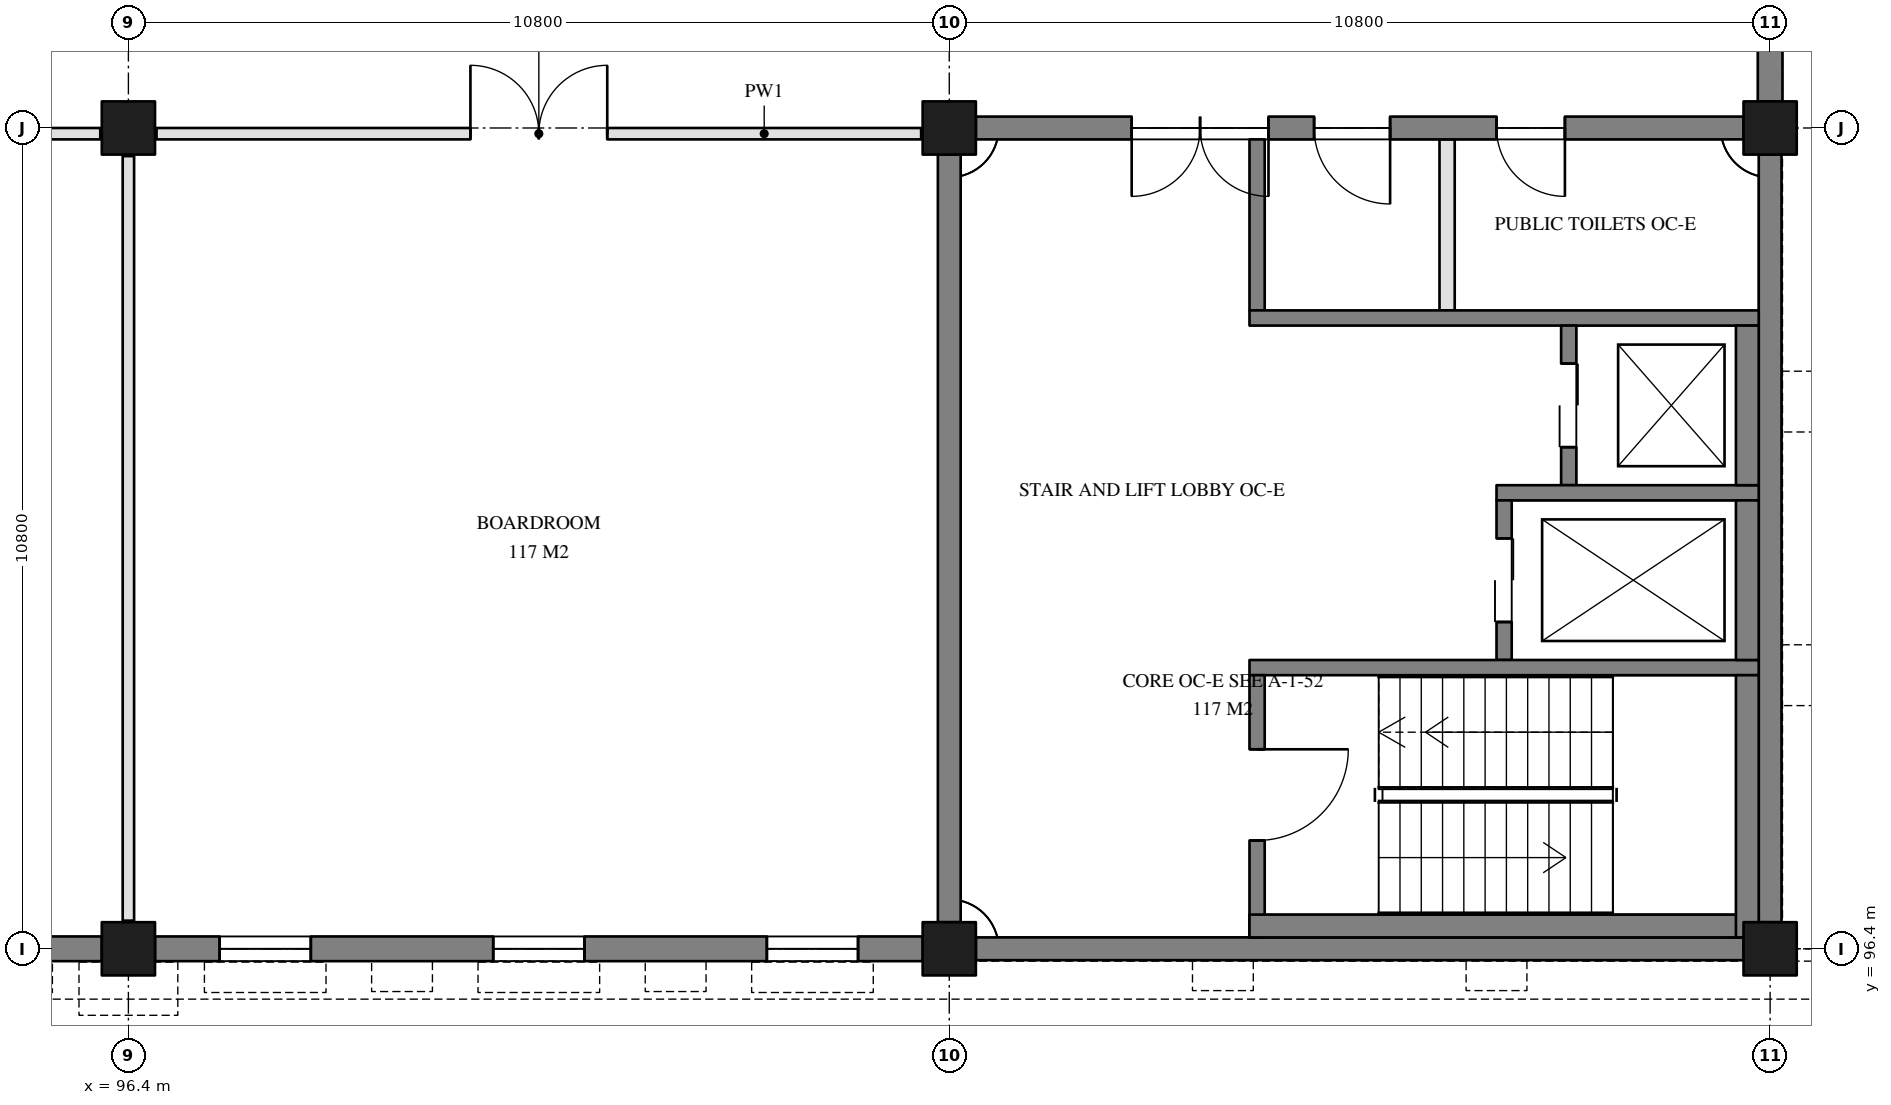
"""IFC4 building model, lengths in metres.
Left out: names, types, materials, properties, quantities, classifications, styles, units other than length and angle.
Written with IfcOpenShell. Run it as: python <this file> out.ifc"""

import sys

from ifc_helpers import new_model, si_unit, direction, frame, frame_2d, origin, origin_2d, place, context, subcontext, project, spatial, rectangle, extrude, element, fill, save


model = new_model("IFC4")
c1 = context("Model", 3, precision=1e-05, world=origin(), true_north=direction((0.0, 1.0)))
c2 = subcontext(c1, "Body", "Model", "MODEL_VIEW")
j1 = project(units=[si_unit("LENGTHUNIT", "METRE"), si_unit("PLANEANGLEUNIT", "RADIAN")], contexts=[c1])
p1 = place(None, origin())
s1 = spatial("IfcSite", under=j1, at=p1, CompositionType="ELEMENT")
p2 = place(p1, origin())
s2 = spatial("IfcBuilding", under=s1, at=p2, CompositionType="ELEMENT")
p3 = place(p2, frame((0.0, 0.0, 16.5)))
s3 = spatial("IfcBuildingStorey", under=s2, at=p3, CompositionType="ELEMENT", Elevation=16.5)
for number, where, z_axis, x_axis in (
    (1, (96.4, 96.4, 0.0), (0.0, 0.0, 1.0), (1.0, 0.0, 0.0)),
    (2, (96.4, 107.2, 0.0), (0.0, 0.0, 1.0), (1.0, 0.0, 0.0)),
    (3, (107.2, 96.4, 0.0), (0.0, 0.0, 1.0), (1.0, 0.0, 0.0)),
    (4, (107.2, 107.2, 0.0), (0.0, 0.0, 1.0), (1.0, 0.0, 0.0)),
    (5, (118.0, 96.4, 0.0), (0.0, 0.0, 1.0), (1.0, 0.0, 0.0)),
    (6, (118.0, 107.2, 0.0), (0.0, 0.0, 1.0), (1.0, 0.0, 0.0)),
):
    element("IfcColumn", number, at=place(p3, frame(where, z_axis=z_axis, x_axis=x_axis)), inside=s3, PredefinedType="COLUMN", context=c2, shape_type="SweptSolid", body=[
        extrude(rectangle(XDim=0.7, YDim=0.7, at=origin_2d()), origin(), (0.0, 0.0, 1.0), 3.9),
    ])
p4 = place(p3, frame((107.55, 96.4, 0.0), z_axis=(0.0, 0.0, 1.0), x_axis=(1.0, 0.0, 0.0)))
e7 = element("IfcWall", 7, at=p4, inside=s3, PredefinedType="SOLIDWALL", context=c2, shape_type="SweptSolid", body=[
    extrude(rectangle(XDim=10.1, YDim=0.3, at=frame_2d((5.05, 0.0))), origin(), (0.0, 0.0, 1.0), 3.9),
])
p5 = place(p3, frame((118.0, 96.75, 0.0), z_axis=(0.0, 0.0, 1.0), x_axis=(0.0, 1.0, 0.0)))
e8 = element("IfcWall", 8, at=p5, inside=s3, PredefinedType="SOLIDWALL", context=c2, shape_type="SweptSolid", body=[
    extrude(rectangle(XDim=10.1, YDim=0.3, at=frame_2d((5.05, 0.0))), origin(), (0.0, 0.0, 1.0), 3.9),
])
p6 = place(p3, frame((117.65, 107.2, 0.0), z_axis=(0.0, 0.0, 1.0), x_axis=(-1.0, 0.0, 0.0)))
e9 = element("IfcWall", 9, at=p6, inside=s3, PredefinedType="SOLIDWALL", context=c2, shape_type="SweptSolid", body=[
    extrude(rectangle(XDim=10.1, YDim=0.3, at=frame_2d((5.05, 0.0))), origin(), (0.0, 0.0, 1.0), 3.9),
])
p7 = place(p6, frame((6.25, 0.0, 0.0)))
e10 = element("IfcOpeningElement", 10, at=p7, cuts=e9, PredefinedType="OPENING", context=c2, shape_type="SweptSolid", body=[
    extrude(rectangle(XDim=1.8, YDim=2.1, at=frame_2d((0.9, 1.05))), frame((0.0, 0.16, 0.0), z_axis=(0.0, -1.0, 0.0), x_axis=(1.0, 0.0, 0.0)), (0.0, 0.0, 1.0), 0.32),
])
p8 = place(p6, frame((4.65, 0.0, 0.0)))
e11 = element("IfcOpeningElement", 11, at=p8, cuts=e9, PredefinedType="OPENING", context=c2, shape_type="SweptSolid", body=[
    extrude(rectangle(XDim=1.0, YDim=2.1, at=frame_2d((0.5, 1.05))), frame((0.0, 0.16, 0.0), z_axis=(0.0, -1.0, 0.0), x_axis=(1.0, 0.0, 0.0)), (0.0, 0.0, 1.0), 0.32),
])
p9 = place(p6, frame((2.35, 0.0, 0.0)))
e12 = element("IfcOpeningElement", 12, at=p9, cuts=e9, PredefinedType="OPENING", context=c2, shape_type="SweptSolid", body=[
    extrude(rectangle(XDim=0.9, YDim=2.1, at=frame_2d((0.45, 1.05))), frame((0.0, 0.16, 0.0), z_axis=(0.0, -1.0, 0.0), x_axis=(1.0, 0.0, 0.0)), (0.0, 0.0, 1.0), 0.32),
])
p10 = place(p3, frame((107.2, 106.85, 0.0), z_axis=(0.0, 0.0, 1.0), x_axis=(0.0, -1.0, 0.0)))
e13 = element("IfcWall", 13, at=p10, inside=s3, PredefinedType="SOLIDWALL", context=c2, shape_type="SweptSolid", body=[
    extrude(rectangle(XDim=10.1, YDim=0.3, at=frame_2d((5.05, 0.0))), origin(), (0.0, 0.0, 1.0), 3.9),
])
p11 = place(p3, frame((92.2, 96.4, 0.0), z_axis=(0.0, 0.0, 1.0), x_axis=(1.0, 0.0, 0.0)))
e14 = element("IfcWall", 14, at=p11, inside=s3, PredefinedType="SOLIDWALL", context=c2, shape_type="SweptSolid", body=[
    extrude(rectangle(XDim=3.85, YDim=0.325, at=frame_2d((1.925, 0.0))), origin(), (0.0, 0.0, 1.0), 2.8),
])
p12 = place(p11, frame((1.8, 0.0, 0.75)))
e15 = element("IfcOpeningElement", 15, at=p12, cuts=e14, PredefinedType="OPENING", context=c2, shape_type="SweptSolid", body=[
    extrude(rectangle(XDim=1.2, YDim=1.95, at=frame_2d((0.6, 0.975))), frame((0.0, 0.172, 0.0), z_axis=(0.0, -1.0, 0.0), x_axis=(1.0, 0.0, 0.0)), (0.0, 0.0, 1.0), 0.345),
])
p13 = place(p3, frame((96.75, 96.4, 0.0), z_axis=(0.0, 0.0, 1.0), x_axis=(1.0, 0.0, 0.0)))
e16 = element("IfcWall", 16, at=p13, inside=s3, PredefinedType="SOLIDWALL", context=c2, shape_type="SweptSolid", body=[
    extrude(rectangle(XDim=10.1, YDim=0.325, at=frame_2d((5.05, 0.0))), origin(), (0.0, 0.0, 1.0), 2.8),
])
p14 = place(p13, frame((0.85, 0.0, 0.75)))
e17 = element("IfcOpeningElement", 17, at=p14, cuts=e16, PredefinedType="OPENING", context=c2, shape_type="SweptSolid", body=[
    extrude(rectangle(XDim=1.2, YDim=1.95, at=frame_2d((0.6, 0.975))), frame((0.0, 0.172, 0.0), z_axis=(0.0, -1.0, 0.0), x_axis=(1.0, 0.0, 0.0)), (0.0, 0.0, 1.0), 0.345),
])
p15 = place(p13, frame((4.45, 0.0, 0.75)))
e18 = element("IfcOpeningElement", 18, at=p15, cuts=e16, PredefinedType="OPENING", context=c2, shape_type="SweptSolid", body=[
    extrude(rectangle(XDim=1.2, YDim=1.95, at=frame_2d((0.6, 0.975))), frame((0.0, 0.172, 0.0), z_axis=(0.0, -1.0, 0.0), x_axis=(1.0, 0.0, 0.0)), (0.0, 0.0, 1.0), 0.345),
])
p16 = place(p13, frame((8.05, 0.0, 0.75)))
e19 = element("IfcOpeningElement", 19, at=p16, cuts=e16, PredefinedType="OPENING", context=c2, shape_type="SweptSolid", body=[
    extrude(rectangle(XDim=1.2, YDim=1.95, at=frame_2d((0.6, 0.975))), frame((0.0, 0.172, 0.0), z_axis=(0.0, -1.0, 0.0), x_axis=(1.0, 0.0, 0.0)), (0.0, 0.0, 1.0), 0.345),
])
p17 = place(p3, frame((118.0, 107.55, 0.0), z_axis=(0.0, 0.0, 1.0), x_axis=(0.0, 1.0, 0.0)))
e20 = element("IfcWall", 20, at=p17, inside=s3, PredefinedType="SOLIDWALL", context=c2, shape_type="SweptSolid", body=[
    extrude(rectangle(XDim=3.85, YDim=0.325, at=frame_2d((1.925, 0.0))), origin(), (0.0, 0.0, 1.0), 2.8),
])
p18 = place(p17, frame((1.0, 0.0, 0.9)))
e21 = element("IfcOpeningElement", 21, at=p18, cuts=e20, PredefinedType="OPENING", context=c2, shape_type="SweptSolid", body=[
    extrude(rectangle(XDim=0.9, YDim=1.8, at=frame_2d((0.45, 0.9))), frame((0.0, 0.172, 0.0), z_axis=(0.0, -1.0, 0.0), x_axis=(1.0, 0.0, 0.0)), (0.0, 0.0, 1.0), 0.345),
])
p19 = place(p3, frame((111.25, 107.05, 0.0), z_axis=(0.0, 0.0, 1.0), x_axis=(0.0, -1.0, 0.0)))
e22 = element("IfcWall", 22, at=p19, inside=s3, PredefinedType="SOLIDWALL", context=c2, shape_type="SweptSolid", body=[
    extrude(rectangle(XDim=2.25, YDim=0.2, at=frame_2d((1.125, 0.0))), origin(), (0.0, 0.0, 1.0), 3.6),
])
p20 = place(p3, frame((111.15, 104.7, 0.0), z_axis=(0.0, 0.0, 1.0), x_axis=(1.0, 0.0, 0.0)))
e23 = element("IfcWall", 23, at=p20, inside=s3, PredefinedType="SOLIDWALL", context=c2, shape_type="SweptSolid", body=[
    extrude(rectangle(XDim=6.7, YDim=0.2, at=frame_2d((3.35, 0.0))), origin(), (0.0, 0.0, 1.0), 3.6),
])
p21 = place(p3, frame((115.35, 104.6, 0.0), z_axis=(0.0, 0.0, 1.0), x_axis=(0.0, -1.0, 0.0)))
e24 = element("IfcWall", 24, at=p21, inside=s3, PredefinedType="SOLIDWALL", context=c2, shape_type="SweptSolid", body=[
    extrude(rectangle(XDim=2.1, YDim=0.2, at=frame_2d((1.05, 0.0))), origin(), (0.0, 0.0, 1.0), 3.6),
])
p22 = place(p21, frame((0.5, 0.0, 0.0)))
e25 = element("IfcOpeningElement", 25, at=p22, cuts=e24, PredefinedType="OPENING", context=c2, shape_type="SweptSolid", body=[
    extrude(rectangle(XDim=1.1, YDim=2.1, at=frame_2d((0.55, 1.05))), frame((0.0, 0.11, 0.0), z_axis=(0.0, -1.0, 0.0), x_axis=(1.0, 0.0, 0.0)), (0.0, 0.0, 1.0), 0.22),
])
p23 = place(p3, frame((114.4, 102.4, 0.0), z_axis=(0.0, 0.0, 1.0), x_axis=(1.0, 0.0, 0.0)))
e26 = element("IfcWall", 26, at=p23, inside=s3, PredefinedType="SOLIDWALL", context=c2, shape_type="SweptSolid", body=[
    extrude(rectangle(XDim=3.45, YDim=0.2, at=frame_2d((1.725, 0.0))), origin(), (0.0, 0.0, 1.0), 3.6),
])
p24 = place(p3, frame((114.5, 102.3, 0.0), z_axis=(0.0, 0.0, 1.0), x_axis=(0.0, -1.0, 0.0)))
e27 = element("IfcWall", 27, at=p24, inside=s3, PredefinedType="SOLIDWALL", context=c2, shape_type="SweptSolid", body=[
    extrude(rectangle(XDim=2.1, YDim=0.2, at=frame_2d((1.05, 0.0))), origin(), (0.0, 0.0, 1.0), 3.6),
])
p25 = place(p24, frame((0.5, 0.0, 0.0)))
e28 = element("IfcOpeningElement", 28, at=p25, cuts=e27, PredefinedType="OPENING", context=c2, shape_type="SweptSolid", body=[
    extrude(rectangle(XDim=1.1, YDim=2.1, at=frame_2d((0.55, 1.05))), frame((0.0, 0.11, 0.0), z_axis=(0.0, -1.0, 0.0), x_axis=(1.0, 0.0, 0.0)), (0.0, 0.0, 1.0), 0.22),
])
p26 = place(p3, frame((111.15, 100.1, 0.0), z_axis=(0.0, 0.0, 1.0), x_axis=(1.0, 0.0, 0.0)))
e29 = element("IfcWall", 29, at=p26, inside=s3, PredefinedType="SOLIDWALL", context=c2, shape_type="SweptSolid", body=[
    extrude(rectangle(XDim=6.7, YDim=0.2, at=frame_2d((3.35, 0.0))), origin(), (0.0, 0.0, 1.0), 3.6),
])
p27 = place(p3, frame((111.25, 100.0, 0.0), z_axis=(0.0, 0.0, 1.0), x_axis=(0.0, -1.0, 0.0)))
e30 = element("IfcWall", 30, at=p27, inside=s3, PredefinedType="SOLIDWALL", context=c2, shape_type="SweptSolid", body=[
    extrude(rectangle(XDim=3.45, YDim=0.2, at=frame_2d((1.725, 0.0))), origin(), (0.0, 0.0, 1.0), 3.6),
])
p28 = place(p27, frame((0.975, 0.0, 0.0)))
e31 = element("IfcOpeningElement", 31, at=p28, cuts=e30, PredefinedType="OPENING", context=c2, shape_type="SweptSolid", body=[
    extrude(rectangle(XDim=1.2, YDim=2.1, at=frame_2d((0.6, 1.05))), frame((0.0, 0.11, 0.0), z_axis=(0.0, -1.0, 0.0), x_axis=(1.0, 0.0, 0.0)), (0.0, 0.0, 1.0), 0.22),
])
p29 = place(p3, frame((111.15, 96.7, -0.3), z_axis=(0.0, 0.0, 1.0), x_axis=(1.0, 0.0, 0.0)))
e32 = element("IfcWall", 32, at=p29, inside=s3, PredefinedType="SOLIDWALL", context=c2, shape_type="SweptSolid", body=[
    extrude(rectangle(XDim=6.7, YDim=0.3, at=frame_2d((3.35, 0.0))), origin(), (0.0, 0.0, 1.0), 3.9),
])
p30 = place(p3, frame((117.7, 100.0, -0.3), z_axis=(0.0, 0.0, 1.0), x_axis=(0.0, -1.0, 0.0)))
e33 = element("IfcWall", 33, at=p30, inside=s3, PredefinedType="SOLIDWALL", context=c2, shape_type="SweptSolid", body=[
    extrude(rectangle(XDim=3.45, YDim=0.3, at=frame_2d((1.725, 0.0))), origin(), (0.0, 0.0, 1.0), 3.9),
])
for number, where, z_axis, x_axis in (
    (34, (117.7, 104.6, -0.3), (0.0, 0.0, 1.0), (0.0, -1.0, 0.0)),
    (35, (117.7, 102.3, -0.3), (0.0, 0.0, 1.0), (0.0, -1.0, 0.0)),
):
    element("IfcWall", number, at=place(p3, frame(where, z_axis=z_axis, x_axis=x_axis)), inside=s3, PredefinedType="SOLIDWALL", context=c2, shape_type="SweptSolid", body=[
        extrude(rectangle(XDim=2.1, YDim=0.3, at=frame_2d((1.05, 0.0))), origin(), (0.0, 0.0, 1.0), 3.9),
    ])
p31 = place(p3, frame((113.75, 107.05, 0.0), z_axis=(0.0, 0.0, 1.0), x_axis=(0.0, -1.0, 0.0)))
e36 = element("IfcWall", 36, at=p31, inside=s3, PredefinedType="PARTITIONING", context=c2, shape_type="SweptSolid", body=[
    extrude(rectangle(XDim=2.25, YDim=0.2, at=frame_2d((1.125, 0.0))), origin(), (0.0, 0.0, 1.0), 3.6),
])
p32 = place(p3, frame((85.97, 107.125, 0.0), z_axis=(0.0, 0.0, 1.0), x_axis=(1.0, 0.0, 0.0)))
e37 = element("IfcWall", 37, at=p32, inside=s3, PredefinedType="PARTITIONING", context=c2, shape_type="SweptSolid", body=[
    extrude(rectangle(XDim=10.06, YDim=0.15, at=frame_2d((5.03, 0.0))), origin(), (0.0, 0.0, 1.0), 2.8),
])
p33 = place(p32, frame((4.13, 0.0, 0.0)))
e38 = element("IfcOpeningElement", 38, at=p33, cuts=e37, PredefinedType="OPENING", context=c2, shape_type="SweptSolid", body=[
    extrude(rectangle(XDim=1.8, YDim=2.1, at=frame_2d((0.9, 1.05))), frame((0.0, 0.085, 0.0), z_axis=(0.0, -1.0, 0.0), x_axis=(1.0, 0.0, 0.0)), (0.0, 0.0, 1.0), 0.17),
])
p34 = place(p3, frame((96.77, 107.125, 0.0), z_axis=(0.0, 0.0, 1.0), x_axis=(1.0, 0.0, 0.0)))
e39 = element("IfcWall", 39, at=p34, inside=s3, PredefinedType="PARTITIONING", context=c2, shape_type="SweptSolid", body=[
    extrude(rectangle(XDim=10.06, YDim=0.15, at=frame_2d((5.03, 0.0))), origin(), (0.0, 0.0, 1.0), 2.8),
])
p35 = place(p34, frame((4.13, 0.0, 0.0)))
e40 = element("IfcOpeningElement", 40, at=p35, cuts=e39, PredefinedType="OPENING", context=c2, shape_type="SweptSolid", body=[
    extrude(rectangle(XDim=1.8, YDim=2.1, at=frame_2d((0.9, 1.05))), frame((0.0, 0.085, 0.0), z_axis=(0.0, -1.0, 0.0), x_axis=(1.0, 0.0, 0.0)), (0.0, 0.0, 1.0), 0.17),
])
p36 = place(p3, frame((96.4, 96.77, 0.0), z_axis=(0.0, 0.0, 1.0), x_axis=(0.0, 1.0, 0.0)))
e41 = element("IfcWall", 41, at=p36, inside=s3, PredefinedType="PARTITIONING", context=c2, shape_type="SweptSolid", body=[
    extrude(rectangle(XDim=10.06, YDim=0.15, at=frame_2d((5.03, 0.0))), origin(), (0.0, 0.0, 1.0), 2.8),
])
p37 = place(p14, origin())
e42 = element("IfcWindow", 42, at=p37, inside=s3, PartitioningType="SINGLE_PANEL", PredefinedType="WINDOW", context=c2, shape_type="SweptSolid", body=[
    extrude(rectangle(XDim=1.2, YDim=1.95, at=frame_2d((0.6, 0.975))), frame((0.0, 0.03, 0.0), z_axis=(0.0, -1.0, 0.0), x_axis=(1.0, 0.0, 0.0)), (0.0, 0.0, 1.0), 0.06),
])
fill(e17, e42)
p38 = place(p15, origin())
e43 = element("IfcWindow", 43, at=p38, inside=s3, PartitioningType="SINGLE_PANEL", PredefinedType="WINDOW", context=c2, shape_type="SweptSolid", body=[
    extrude(rectangle(XDim=1.2, YDim=1.95, at=frame_2d((0.6, 0.975))), frame((0.0, 0.03, 0.0), z_axis=(0.0, -1.0, 0.0), x_axis=(1.0, 0.0, 0.0)), (0.0, 0.0, 1.0), 0.06),
])
fill(e18, e43)
p39 = place(p16, origin())
e44 = element("IfcWindow", 44, at=p39, inside=s3, PartitioningType="SINGLE_PANEL", PredefinedType="WINDOW", context=c2, shape_type="SweptSolid", body=[
    extrude(rectangle(XDim=1.2, YDim=1.95, at=frame_2d((0.6, 0.975))), frame((0.0, 0.03, 0.0), z_axis=(0.0, -1.0, 0.0), x_axis=(1.0, 0.0, 0.0)), (0.0, 0.0, 1.0), 0.06),
])
fill(e19, e44)
p40 = place(p22, frame((1.1, 0.0, 0.0), z_axis=(0.0, 0.0, 1.0), x_axis=(-1.0, 0.0, 0.0)))
e45 = element("IfcDoor", 45, at=p40, inside=s3, OperationType="DOUBLE_DOOR_SLIDING", PredefinedType="DOOR", context=c2, shape_type="SweptSolid", body=[
    extrude(rectangle(XDim=1.1, YDim=2.1, at=frame_2d((0.55, 1.05))), frame((0.0, 0.025, 0.0), z_axis=(0.0, -1.0, 0.0), x_axis=(1.0, 0.0, 0.0)), (0.0, 0.0, 1.0), 0.05),
])
fill(e25, e45)
p41 = place(p25, frame((1.1, 0.0, 0.0), z_axis=(0.0, 0.0, 1.0), x_axis=(-1.0, 0.0, 0.0)))
e46 = element("IfcDoor", 46, at=p41, inside=s3, OperationType="DOUBLE_DOOR_SLIDING", PredefinedType="DOOR", context=c2, shape_type="SweptSolid", body=[
    extrude(rectangle(XDim=1.1, YDim=2.1, at=frame_2d((0.55, 1.05))), frame((0.0, 0.025, 0.0), z_axis=(0.0, -1.0, 0.0), x_axis=(1.0, 0.0, 0.0)), (0.0, 0.0, 1.0), 0.05),
])
fill(e28, e46)
p42 = place(p28, frame((1.2, 0.0, 0.0), z_axis=(0.0, 0.0, 1.0), x_axis=(-1.0, 0.0, 0.0)))
e47 = element("IfcDoor", 47, at=p42, inside=s3, OperationType="SINGLE_SWING_RIGHT", PredefinedType="DOOR", context=c2, shape_type="SweptSolid", body=[
    extrude(rectangle(XDim=1.2, YDim=2.1, at=frame_2d((0.6, 1.05))), frame((0.0, 0.025, 0.0), z_axis=(0.0, -1.0, 0.0), x_axis=(1.0, 0.0, 0.0)), (0.0, 0.0, 1.0), 0.05),
])
fill(e31, e47)
p43 = place(p7, frame((1.8, 0.0, 0.0), z_axis=(0.0, 0.0, 1.0), x_axis=(-1.0, 0.0, 0.0)))
e48 = element("IfcDoor", 48, at=p43, inside=s3, OperationType="DOUBLE_DOOR_DOUBLE_SWING", PredefinedType="DOOR", context=c2, shape_type="SweptSolid", body=[
    extrude(rectangle(XDim=1.8, YDim=2.1, at=frame_2d((0.9, 1.05))), frame((0.0, 0.025, 0.0), z_axis=(0.0, -1.0, 0.0), x_axis=(1.0, 0.0, 0.0)), (0.0, 0.0, 1.0), 0.05),
])
fill(e10, e48)
p44 = place(p8, origin())
e49 = element("IfcDoor", 49, at=p44, inside=s3, OperationType="SINGLE_SWING_RIGHT", PredefinedType="DOOR", context=c2, shape_type="SweptSolid", body=[
    extrude(rectangle(XDim=1.0, YDim=2.1, at=frame_2d((0.5, 1.05))), frame((0.0, 0.025, 0.0), z_axis=(0.0, -1.0, 0.0), x_axis=(1.0, 0.0, 0.0)), (0.0, 0.0, 1.0), 0.05),
])
fill(e11, e49)
p45 = place(p9, origin())
e50 = element("IfcDoor", 50, at=p45, inside=s3, OperationType="SINGLE_SWING_LEFT", PredefinedType="DOOR", context=c2, shape_type="SweptSolid", body=[
    extrude(rectangle(XDim=0.9, YDim=2.1, at=frame_2d((0.45, 1.05))), frame((0.0, 0.025, 0.0), z_axis=(0.0, -1.0, 0.0), x_axis=(1.0, 0.0, 0.0)), (0.0, 0.0, 1.0), 0.05),
])
fill(e12, e50)
p46 = place(p35, origin())
e51 = element("IfcDoor", 51, at=p46, inside=s3, OperationType="DOUBLE_DOOR_DOUBLE_SWING", PredefinedType="DOOR", context=c2, shape_type="SweptSolid", body=[
    extrude(rectangle(XDim=1.8, YDim=2.1, at=frame_2d((0.9, 1.05))), frame((0.0, 0.025, 0.0), z_axis=(0.0, -1.0, 0.0), x_axis=(1.0, 0.0, 0.0)), (0.0, 0.0, 1.0), 0.05),
])
fill(e40, e51)
save(model, sys.argv[1])
